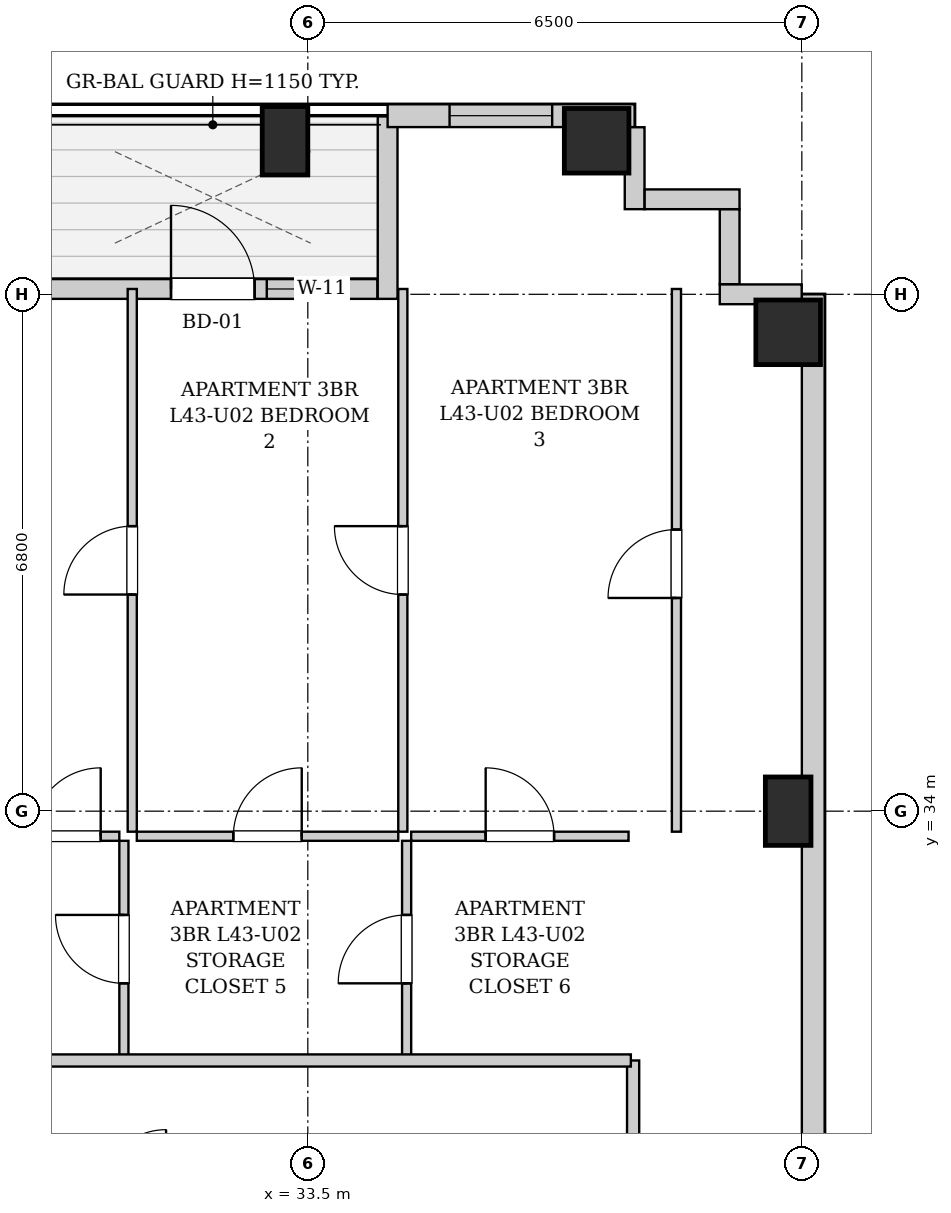
"""IFC4 building model, lengths in metres.
Left out: names, types, materials, properties, quantities, classifications, styles, units other than length and angle.
Written with IfcOpenShell. Run it as: python <this file> out.ifc"""

import sys

from ifc_helpers import new_model, si_unit, direction, frame, frame_2d, origin, origin_2d, place, context, subcontext, project, spatial, rectangle, extrude, element, fill, save


model = new_model("IFC4")
c1 = context("Model", 3, precision=1e-05, world=origin(), true_north=direction((0.0, 1.0)))
c2 = subcontext(c1, "Body", "Model", "MODEL_VIEW")
j1 = project(units=[si_unit("LENGTHUNIT", "METRE"), si_unit("PLANEANGLEUNIT", "RADIAN")], contexts=[c1])
p1 = place(None, origin())
s1 = spatial("IfcSite", under=j1, at=p1, CompositionType="ELEMENT")
p2 = place(p1, origin())
s2 = spatial("IfcBuilding", under=s1, at=p2, CompositionType="ELEMENT")
p3 = place(p2, frame((0.0, 0.0, 150.4)))
s3 = spatial("IfcBuildingStorey", under=s2, at=p3, CompositionType="ELEMENT", Elevation=150.4)
p4 = place(p3, frame((33.2, 42.82, 0.0), z_axis=(0.0, 0.0, 1.0), x_axis=(1.0, 0.0, 0.0)))
e1 = element("IfcColumn", 1, at=p4, inside=s3, PredefinedType="COLUMN", context=c2, shape_type="SweptSolid", body=[
    extrude(rectangle(XDim=0.6, YDim=0.9, at=origin_2d()), origin(), (0.0, 0.0, 1.0), 3.25),
])
p5 = place(p3, frame((37.3, 42.82, 0.0), z_axis=(0.0, 0.0, 1.0), x_axis=(1.0, 0.0, 0.0)))
e2 = element("IfcColumn", 2, at=p5, inside=s3, PredefinedType="COLUMN", context=c2, shape_type="SweptSolid", body=[
    extrude(rectangle(XDim=0.85, YDim=0.85, at=origin_2d()), origin(), (0.0, 0.0, 1.0), 3.25),
])
p6 = place(p3, frame((39.82, 34.0, 0.0), z_axis=(0.0, 0.0, 1.0), x_axis=(1.0, 0.0, 0.0)))
e3 = element("IfcColumn", 3, at=p6, inside=s3, PredefinedType="COLUMN", context=c2, shape_type="SweptSolid", body=[
    extrude(rectangle(XDim=0.6, YDim=0.9, at=origin_2d()), origin(), (0.0, 0.0, 1.0), 3.25),
])
p7 = place(p3, frame((39.82, 40.3, 0.0), z_axis=(0.0, 0.0, 1.0), x_axis=(1.0, 0.0, 0.0)))
e4 = element("IfcColumn", 4, at=p7, inside=s3, PredefinedType="COLUMN", context=c2, shape_type="SweptSolid", body=[
    extrude(rectangle(XDim=0.85, YDim=0.85, at=origin_2d()), origin(), (0.0, 0.0, 1.0), 3.25),
])
p8 = place(p3, frame((30.084, 40.87, 0.0), z_axis=(0.0, 0.0, 1.0), x_axis=(1.0, 0.0, 0.0)))
e5 = element("IfcWall", 5, at=p8, inside=s3, PredefinedType="SOLIDWALL", context=c2, shape_type="SweptSolid", body=[
    extrude(rectangle(XDim=4.332, YDim=0.26, at=frame_2d((2.166, 0.0))), origin(), (0.0, 0.0, 1.0), 2.99),
])
p9 = place(p8, frame((1.616, 0.0, 0.0)))
e6 = element("IfcOpeningElement", 6, at=p9, cuts=e5, PredefinedType="OPENING", context=c2, shape_type="SweptSolid", body=[
    extrude(rectangle(XDim=1.1, YDim=2.0, at=frame_2d((0.55, 1.0))), frame((0.0, 0.14, 0.0), z_axis=(0.0, -1.0, 0.0), x_axis=(1.0, 0.0, 0.0)), (0.0, 0.0, 1.0), 0.28),
])
p10 = place(p8, frame((2.876, 0.0, 0.55)))
e7 = element("IfcOpeningElement", 7, at=p10, cuts=e5, PredefinedType="OPENING", context=c2, shape_type="SweptSolid", body=[
    extrude(rectangle(XDim=0.85, YDim=1.2, at=frame_2d((0.425, 0.6))), frame((0.0, 0.14, 0.0), z_axis=(0.0, -1.0, 0.0), x_axis=(1.0, 0.0, 0.0)), (0.0, 0.0, 1.0), 0.28),
])
p11 = place(p3, frame((34.55, 40.74, 0.0), z_axis=(0.0, 0.0, 1.0), x_axis=(0.0, 1.0, 0.0)))
e8 = element("IfcWall", 8, at=p11, inside=s3, PredefinedType="SOLIDWALL", context=c2, shape_type="SweptSolid", body=[
    extrude(rectangle(XDim=2.4, YDim=0.26, at=frame_2d((1.2, 0.0))), origin(), (0.0, 0.0, 1.0), 2.99),
])
p12 = place(p3, frame((34.55, 43.15, 0.0), z_axis=(0.0, 0.0, 1.0), x_axis=(1.0, 0.0, 0.0)))
e9 = element("IfcWall", 9, at=p12, inside=s3, PredefinedType="SOLIDWALL", context=c2, shape_type="SweptSolid", body=[
    extrude(rectangle(XDim=3.25, YDim=0.3, at=frame_2d((1.625, 0.0))), origin(), (0.0, 0.0, 1.0), 2.99),
])
p13 = place(p12, frame((0.815, 0.0, 0.55)))
e10 = element("IfcOpeningElement", 10, at=p13, cuts=e9, PredefinedType="OPENING", context=c2, shape_type="SweptSolid", body=[
    extrude(rectangle(XDim=1.35, YDim=1.2, at=frame_2d((0.675, 0.6))), frame((0.0, 0.16, 0.0), z_axis=(0.0, -1.0, 0.0), x_axis=(1.0, 0.0, 0.0)), (0.0, 0.0, 1.0), 0.32),
])
p14 = place(p3, frame((40.15, 40.8, 0.0), z_axis=(0.0, 0.0, 1.0), x_axis=(0.0, -1.0, 0.0)))
e11 = element("IfcWall", 11, at=p14, inside=s3, PredefinedType="SOLIDWALL", context=c2, shape_type="SweptSolid", body=[
    extrude(rectangle(XDim=34.5, YDim=0.3, at=frame_2d((17.25, 0.0))), origin(), (0.0, 0.0, 1.0), 2.99),
])
p15 = place(p14, frame((31.725, 0.0, 0.55)))
e12 = element("IfcOpeningElement", 12, at=p15, cuts=e11, PredefinedType="OPENING", context=c2, shape_type="SweptSolid", body=[
    extrude(rectangle(XDim=1.35, YDim=1.2, at=frame_2d((0.675, 0.6))), frame((0.0, 0.16, 0.0), z_axis=(0.0, -1.0, 0.0), x_axis=(1.0, 0.0, 0.0)), (0.0, 0.0, 1.0), 0.32),
])
p16 = place(p14, frame((22.8, 0.0, 0.55)))
e13 = element("IfcOpeningElement", 13, at=p16, cuts=e11, PredefinedType="OPENING", context=c2, shape_type="SweptSolid", body=[
    extrude(rectangle(XDim=1.35, YDim=1.2, at=frame_2d((0.675, 0.6))), frame((0.0, 0.16, 0.0), z_axis=(0.0, -1.0, 0.0), x_axis=(1.0, 0.0, 0.0)), (0.0, 0.0, 1.0), 0.32),
])
p17 = place(p14, frame((13.425, 0.0, 0.55)))
e14 = element("IfcOpeningElement", 14, at=p17, cuts=e11, PredefinedType="OPENING", context=c2, shape_type="SweptSolid", body=[
    extrude(rectangle(XDim=1.35, YDim=1.2, at=frame_2d((0.675, 0.6))), frame((0.0, 0.16, 0.0), z_axis=(0.0, -1.0, 0.0), x_axis=(1.0, 0.0, 0.0)), (0.0, 0.0, 1.0), 0.32),
])
p18 = place(p3, frame((37.8, 42.998, 0.0), z_axis=(0.0, 0.0, 1.0), x_axis=(0.0, -1.0, 0.0)))
e15 = element("IfcWall", 15, at=p18, inside=s3, PredefinedType="SOLIDWALL", context=c2, shape_type="SweptSolid", body=[
    extrude(rectangle(XDim=1.078, YDim=0.26, at=frame_2d((0.539, 0.0))), origin(), (0.0, 0.0, 1.0), 2.99),
])
p19 = place(p3, frame((37.932, 42.05, 0.0), z_axis=(0.0, 0.0, 1.0), x_axis=(1.0, 0.0, 0.0)))
e16 = element("IfcWall", 16, at=p19, inside=s3, PredefinedType="SOLIDWALL", context=c2, shape_type="SweptSolid", body=[
    extrude(rectangle(XDim=1.248, YDim=0.26, at=frame_2d((0.624, 0.0))), origin(), (0.0, 0.0, 1.0), 2.99),
])
p20 = place(p3, frame((39.05, 41.918, 0.0), z_axis=(0.0, 0.0, 1.0), x_axis=(0.0, -1.0, 0.0)))
e17 = element("IfcWall", 17, at=p20, inside=s3, PredefinedType="SOLIDWALL", context=c2, shape_type="SweptSolid", body=[
    extrude(rectangle(XDim=0.986, YDim=0.26, at=frame_2d((0.493, 0.0))), origin(), (0.0, 0.0, 1.0), 2.99),
])
p21 = place(p3, frame((38.92, 40.8, 0.0), z_axis=(0.0, 0.0, 1.0), x_axis=(1.0, 0.0, 0.0)))
e18 = element("IfcWall", 18, at=p21, inside=s3, PredefinedType="SOLIDWALL", context=c2, shape_type="SweptSolid", body=[
    extrude(rectangle(XDim=1.078, YDim=0.26, at=frame_2d((0.539, 0.0))), origin(), (0.0, 0.0, 1.0), 2.99),
])
p22 = place(p3, frame((37.78, 28.98, 0.0), z_axis=(0.0, 0.0, 1.0), x_axis=(0.0, 1.0, 0.0)))
e19 = element("IfcWall", 19, at=p22, inside=s3, PredefinedType="PARTITIONING", context=c2, shape_type="SweptSolid", body=[
    extrude(rectangle(XDim=1.74, YDim=0.16, at=frame_2d((0.87, 0.0))), origin(), (0.0, 0.0, 1.0), 2.99),
])
p23 = place(p3, frame((31.08, 30.76, 0.0), z_axis=(0.0, 0.0, 1.0), x_axis=(0.0, 1.0, 0.0)))
e20 = element("IfcWall", 20, at=p23, inside=s3, PredefinedType="PARTITIONING", context=c2, shape_type="SweptSolid", body=[
    extrude(rectangle(XDim=2.85, YDim=0.12, at=frame_2d((1.425, 0.0))), origin(), (0.0, 0.0, 1.0), 2.99),
])
p24 = place(p23, frame((0.975, 0.0, 0.0)))
e21 = element("IfcOpeningElement", 21, at=p24, cuts=e20, PredefinedType="OPENING", context=c2, shape_type="SweptSolid", body=[
    extrude(rectangle(XDim=0.9, YDim=2.05, at=frame_2d((0.45, 1.025))), frame((0.0, 0.07, 0.0), z_axis=(0.0, -1.0, 0.0), x_axis=(1.0, 0.0, 0.0)), (0.0, 0.0, 1.0), 0.14),
])
p25 = place(p3, frame((29.63, 33.67, 0.0), z_axis=(0.0, 0.0, 1.0), x_axis=(1.0, 0.0, 0.0)))
e22 = element("IfcWall", 22, at=p25, inside=s3, PredefinedType="PARTITIONING", context=c2, shape_type="SweptSolid", body=[
    extrude(rectangle(XDim=1.39, YDim=0.12, at=frame_2d((0.695, 0.0))), origin(), (0.0, 0.0, 1.0), 2.99),
])
p26 = place(p25, frame((0.245, 0.0, 0.0)))
e23 = element("IfcOpeningElement", 23, at=p26, cuts=e22, PredefinedType="OPENING", context=c2, shape_type="SweptSolid", body=[
    extrude(rectangle(XDim=0.9, YDim=2.05, at=frame_2d((0.45, 1.025))), frame((0.0, 0.07, 0.0), z_axis=(0.0, -1.0, 0.0), x_axis=(1.0, 0.0, 0.0)), (0.0, 0.0, 1.0), 0.14),
])
p27 = place(p3, frame((34.8, 30.76, 0.0), z_axis=(0.0, 0.0, 1.0), x_axis=(0.0, 1.0, 0.0)))
e24 = element("IfcWall", 24, at=p27, inside=s3, PredefinedType="PARTITIONING", context=c2, shape_type="SweptSolid", body=[
    extrude(rectangle(XDim=2.85, YDim=0.12, at=frame_2d((1.425, 0.0))), origin(), (0.0, 0.0, 1.0), 2.99),
])
p28 = place(p27, frame((0.975, 0.0, 0.0)))
e25 = element("IfcOpeningElement", 25, at=p28, cuts=e24, PredefinedType="OPENING", context=c2, shape_type="SweptSolid", body=[
    extrude(rectangle(XDim=0.9, YDim=2.05, at=frame_2d((0.45, 1.025))), frame((0.0, 0.07, 0.0), z_axis=(0.0, -1.0, 0.0), x_axis=(1.0, 0.0, 0.0)), (0.0, 0.0, 1.0), 0.14),
])
p29 = place(p3, frame((31.25, 33.67, 0.0), z_axis=(0.0, 0.0, 1.0), x_axis=(1.0, 0.0, 0.0)))
e26 = element("IfcWall", 26, at=p29, inside=s3, PredefinedType="PARTITIONING", context=c2, shape_type="SweptSolid", body=[
    extrude(rectangle(XDim=3.44, YDim=0.12, at=frame_2d((1.72, 0.0))), origin(), (0.0, 0.0, 1.0), 2.99),
])
p30 = place(p29, frame((1.27, 0.0, 0.0)))
e27 = element("IfcOpeningElement", 27, at=p30, cuts=e26, PredefinedType="OPENING", context=c2, shape_type="SweptSolid", body=[
    extrude(rectangle(XDim=0.9, YDim=2.05, at=frame_2d((0.45, 1.025))), frame((0.0, 0.07, 0.0), z_axis=(0.0, -1.0, 0.0), x_axis=(1.0, 0.0, 0.0)), (0.0, 0.0, 1.0), 0.14),
])
p31 = place(p3, frame((34.86, 33.67, 0.0), z_axis=(0.0, 0.0, 1.0), x_axis=(1.0, 0.0, 0.0)))
e28 = element("IfcWall", 28, at=p31, inside=s3, PredefinedType="PARTITIONING", context=c2, shape_type="SweptSolid", body=[
    extrude(rectangle(XDim=2.86, YDim=0.12, at=frame_2d((1.43, 0.0))), origin(), (0.0, 0.0, 1.0), 2.99),
])
p32 = place(p31, frame((0.98, 0.0, 0.0)))
e29 = element("IfcOpeningElement", 29, at=p32, cuts=e28, PredefinedType="OPENING", context=c2, shape_type="SweptSolid", body=[
    extrude(rectangle(XDim=0.9, YDim=2.05, at=frame_2d((0.45, 1.025))), frame((0.0, 0.07, 0.0), z_axis=(0.0, -1.0, 0.0), x_axis=(1.0, 0.0, 0.0)), (0.0, 0.0, 1.0), 0.14),
])
p33 = place(p3, frame((31.19, 33.73, 0.0), z_axis=(0.0, 0.0, 1.0), x_axis=(0.0, 1.0, 0.0)))
e30 = element("IfcWall", 30, at=p33, inside=s3, PredefinedType="PARTITIONING", context=c2, shape_type="SweptSolid", body=[
    extrude(rectangle(XDim=7.14, YDim=0.12, at=frame_2d((3.57, 0.0))), origin(), (0.0, 0.0, 1.0), 2.99),
])
p34 = place(p33, frame((3.12, 0.0, 0.0)))
e31 = element("IfcOpeningElement", 31, at=p34, cuts=e30, PredefinedType="OPENING", context=c2, shape_type="SweptSolid", body=[
    extrude(rectangle(XDim=0.9, YDim=2.05, at=frame_2d((0.45, 1.025))), frame((0.0, 0.07, 0.0), z_axis=(0.0, -1.0, 0.0), x_axis=(1.0, 0.0, 0.0)), (0.0, 0.0, 1.0), 0.14),
])
p35 = place(p3, frame((34.75, 33.73, 0.0), z_axis=(0.0, 0.0, 1.0), x_axis=(0.0, 1.0, 0.0)))
e32 = element("IfcWall", 32, at=p35, inside=s3, PredefinedType="PARTITIONING", context=c2, shape_type="SweptSolid", body=[
    extrude(rectangle(XDim=7.14, YDim=0.12, at=frame_2d((3.57, 0.0))), origin(), (0.0, 0.0, 1.0), 2.99),
])
p36 = place(p35, frame((3.12, 0.0, 0.0)))
e33 = element("IfcOpeningElement", 33, at=p36, cuts=e32, PredefinedType="OPENING", context=c2, shape_type="SweptSolid", body=[
    extrude(rectangle(XDim=0.9, YDim=2.05, at=frame_2d((0.45, 1.025))), frame((0.0, 0.07, 0.0), z_axis=(0.0, -1.0, 0.0), x_axis=(1.0, 0.0, 0.0)), (0.0, 0.0, 1.0), 0.14),
])
p37 = place(p3, frame((38.35, 33.73, 0.0), z_axis=(0.0, 0.0, 1.0), x_axis=(0.0, 1.0, 0.0)))
e34 = element("IfcWall", 34, at=p37, inside=s3, PredefinedType="PARTITIONING", context=c2, shape_type="SweptSolid", body=[
    extrude(rectangle(XDim=7.14, YDim=0.12, at=frame_2d((3.57, 0.0))), origin(), (0.0, 0.0, 1.0), 2.99),
])
p38 = place(p37, frame((3.075, 0.0, 0.0)))
e35 = element("IfcOpeningElement", 35, at=p38, cuts=e34, PredefinedType="OPENING", context=c2, shape_type="SweptSolid", body=[
    extrude(rectangle(XDim=0.9, YDim=2.05, at=frame_2d((0.45, 1.025))), frame((0.0, 0.07, 0.0), z_axis=(0.0, -1.0, 0.0), x_axis=(1.0, 0.0, 0.0)), (0.0, 0.0, 1.0), 0.14),
])
p39 = place(p3, frame((10.05, 30.72, 0.0), z_axis=(0.0, 0.0, 1.0), x_axis=(1.0, 0.0, 0.0)))
e36 = element("IfcWall", 36, at=p39, inside=s3, PredefinedType="PARTITIONING", context=c2, shape_type="SweptSolid", body=[
    extrude(rectangle(XDim=27.7, YDim=0.16, at=frame_2d((13.85, 0.0))), origin(), (0.0, 0.0, 1.0), 2.99),
])
p40 = place(p39, frame((4.295, 0.0, 0.0)))
e37 = element("IfcOpeningElement", 37, at=p40, cuts=e36, PredefinedType="OPENING", context=c2, shape_type="SweptSolid", body=[
    extrude(rectangle(XDim=0.95, YDim=2.1, at=frame_2d((0.475, 1.05))), frame((0.0, 0.09, 0.0), z_axis=(0.0, -1.0, 0.0), x_axis=(1.0, 0.0, 0.0)), (0.0, 0.0, 1.0), 0.18),
])
p41 = place(p24, origin())
e38 = element("IfcDoor", 38, at=p41, inside=s3, OperationType="SINGLE_SWING_RIGHT", PredefinedType="DOOR", context=c2, shape_type="SweptSolid", body=[
    extrude(rectangle(XDim=0.9, YDim=2.05, at=frame_2d((0.45, 1.025))), frame((0.0, 0.025, 0.0), z_axis=(0.0, -1.0, 0.0), x_axis=(1.0, 0.0, 0.0)), (0.0, 0.0, 1.0), 0.05),
])
fill(e21, e38)
p42 = place(p26, origin())
e39 = element("IfcDoor", 39, at=p42, inside=s3, OperationType="SINGLE_SWING_RIGHT", PredefinedType="DOOR", context=c2, shape_type="SweptSolid", body=[
    extrude(rectangle(XDim=0.9, YDim=2.05, at=frame_2d((0.45, 1.025))), frame((0.0, 0.025, 0.0), z_axis=(0.0, -1.0, 0.0), x_axis=(1.0, 0.0, 0.0)), (0.0, 0.0, 1.0), 0.05),
])
fill(e23, e39)
p43 = place(p28, origin())
e40 = element("IfcDoor", 40, at=p43, inside=s3, OperationType="SINGLE_SWING_LEFT", PredefinedType="DOOR", context=c2, shape_type="SweptSolid", body=[
    extrude(rectangle(XDim=0.9, YDim=2.05, at=frame_2d((0.45, 1.025))), frame((0.0, 0.025, 0.0), z_axis=(0.0, -1.0, 0.0), x_axis=(1.0, 0.0, 0.0)), (0.0, 0.0, 1.0), 0.05),
])
fill(e25, e40)
p44 = place(p30, origin())
e41 = element("IfcDoor", 41, at=p44, inside=s3, OperationType="SINGLE_SWING_RIGHT", PredefinedType="DOOR", context=c2, shape_type="SweptSolid", body=[
    extrude(rectangle(XDim=0.9, YDim=2.05, at=frame_2d((0.45, 1.025))), frame((0.0, 0.025, 0.0), z_axis=(0.0, -1.0, 0.0), x_axis=(1.0, 0.0, 0.0)), (0.0, 0.0, 1.0), 0.05),
])
fill(e27, e41)
p45 = place(p32, origin())
e42 = element("IfcDoor", 42, at=p45, inside=s3, OperationType="SINGLE_SWING_LEFT", PredefinedType="DOOR", context=c2, shape_type="SweptSolid", body=[
    extrude(rectangle(XDim=0.9, YDim=2.05, at=frame_2d((0.45, 1.025))), frame((0.0, 0.025, 0.0), z_axis=(0.0, -1.0, 0.0), x_axis=(1.0, 0.0, 0.0)), (0.0, 0.0, 1.0), 0.05),
])
fill(e29, e42)
p46 = place(p34, origin())
e43 = element("IfcDoor", 43, at=p46, inside=s3, OperationType="SINGLE_SWING_LEFT", PredefinedType="DOOR", context=c2, shape_type="SweptSolid", body=[
    extrude(rectangle(XDim=0.9, YDim=2.05, at=frame_2d((0.45, 1.025))), frame((0.0, 0.025, 0.0), z_axis=(0.0, -1.0, 0.0), x_axis=(1.0, 0.0, 0.0)), (0.0, 0.0, 1.0), 0.05),
])
fill(e31, e43)
p47 = place(p36, origin())
e44 = element("IfcDoor", 44, at=p47, inside=s3, OperationType="SINGLE_SWING_RIGHT", PredefinedType="DOOR", context=c2, shape_type="SweptSolid", body=[
    extrude(rectangle(XDim=0.9, YDim=2.05, at=frame_2d((0.45, 1.025))), frame((0.0, 0.025, 0.0), z_axis=(0.0, -1.0, 0.0), x_axis=(1.0, 0.0, 0.0)), (0.0, 0.0, 1.0), 0.05),
])
fill(e33, e44)
p48 = place(p38, origin())
e45 = element("IfcDoor", 45, at=p48, inside=s3, OperationType="SINGLE_SWING_LEFT", PredefinedType="DOOR", context=c2, shape_type="SweptSolid", body=[
    extrude(rectangle(XDim=0.9, YDim=2.05, at=frame_2d((0.45, 1.025))), frame((0.0, 0.025, 0.0), z_axis=(0.0, -1.0, 0.0), x_axis=(1.0, 0.0, 0.0)), (0.0, 0.0, 1.0), 0.05),
])
fill(e35, e45)
p49 = place(p9, origin())
e46 = element("IfcDoor", 46, at=p49, inside=s3, OperationType="SINGLE_SWING_LEFT", PredefinedType="DOOR", context=c2, shape_type="SweptSolid", body=[
    extrude(rectangle(XDim=1.1, YDim=2.0, at=frame_2d((0.55, 1.0))), frame((0.0, 0.025, 0.0), z_axis=(0.0, -1.0, 0.0), x_axis=(1.0, 0.0, 0.0)), (0.0, 0.0, 1.0), 0.05),
])
fill(e6, e46)
p50 = place(p10, origin())
e47 = element("IfcWindow", 47, at=p50, inside=s3, PartitioningType="SINGLE_PANEL", PredefinedType="WINDOW", context=c2, shape_type="SweptSolid", body=[
    extrude(rectangle(XDim=0.85, YDim=1.2, at=frame_2d((0.425, 0.6))), frame((0.0, 0.03, 0.0), z_axis=(0.0, -1.0, 0.0), x_axis=(1.0, 0.0, 0.0)), (0.0, 0.0, 1.0), 0.06),
])
fill(e7, e47)
p51 = place(p13, origin())
e48 = element("IfcWindow", 48, at=p51, inside=s3, PartitioningType="SINGLE_PANEL", PredefinedType="WINDOW", context=c2, shape_type="SweptSolid", body=[
    extrude(rectangle(XDim=1.35, YDim=1.2, at=frame_2d((0.675, 0.6))), frame((0.0, 0.03, 0.0), z_axis=(0.0, -1.0, 0.0), x_axis=(1.0, 0.0, 0.0)), (0.0, 0.0, 1.0), 0.06),
])
fill(e10, e48)
save(model, sys.argv[1])
